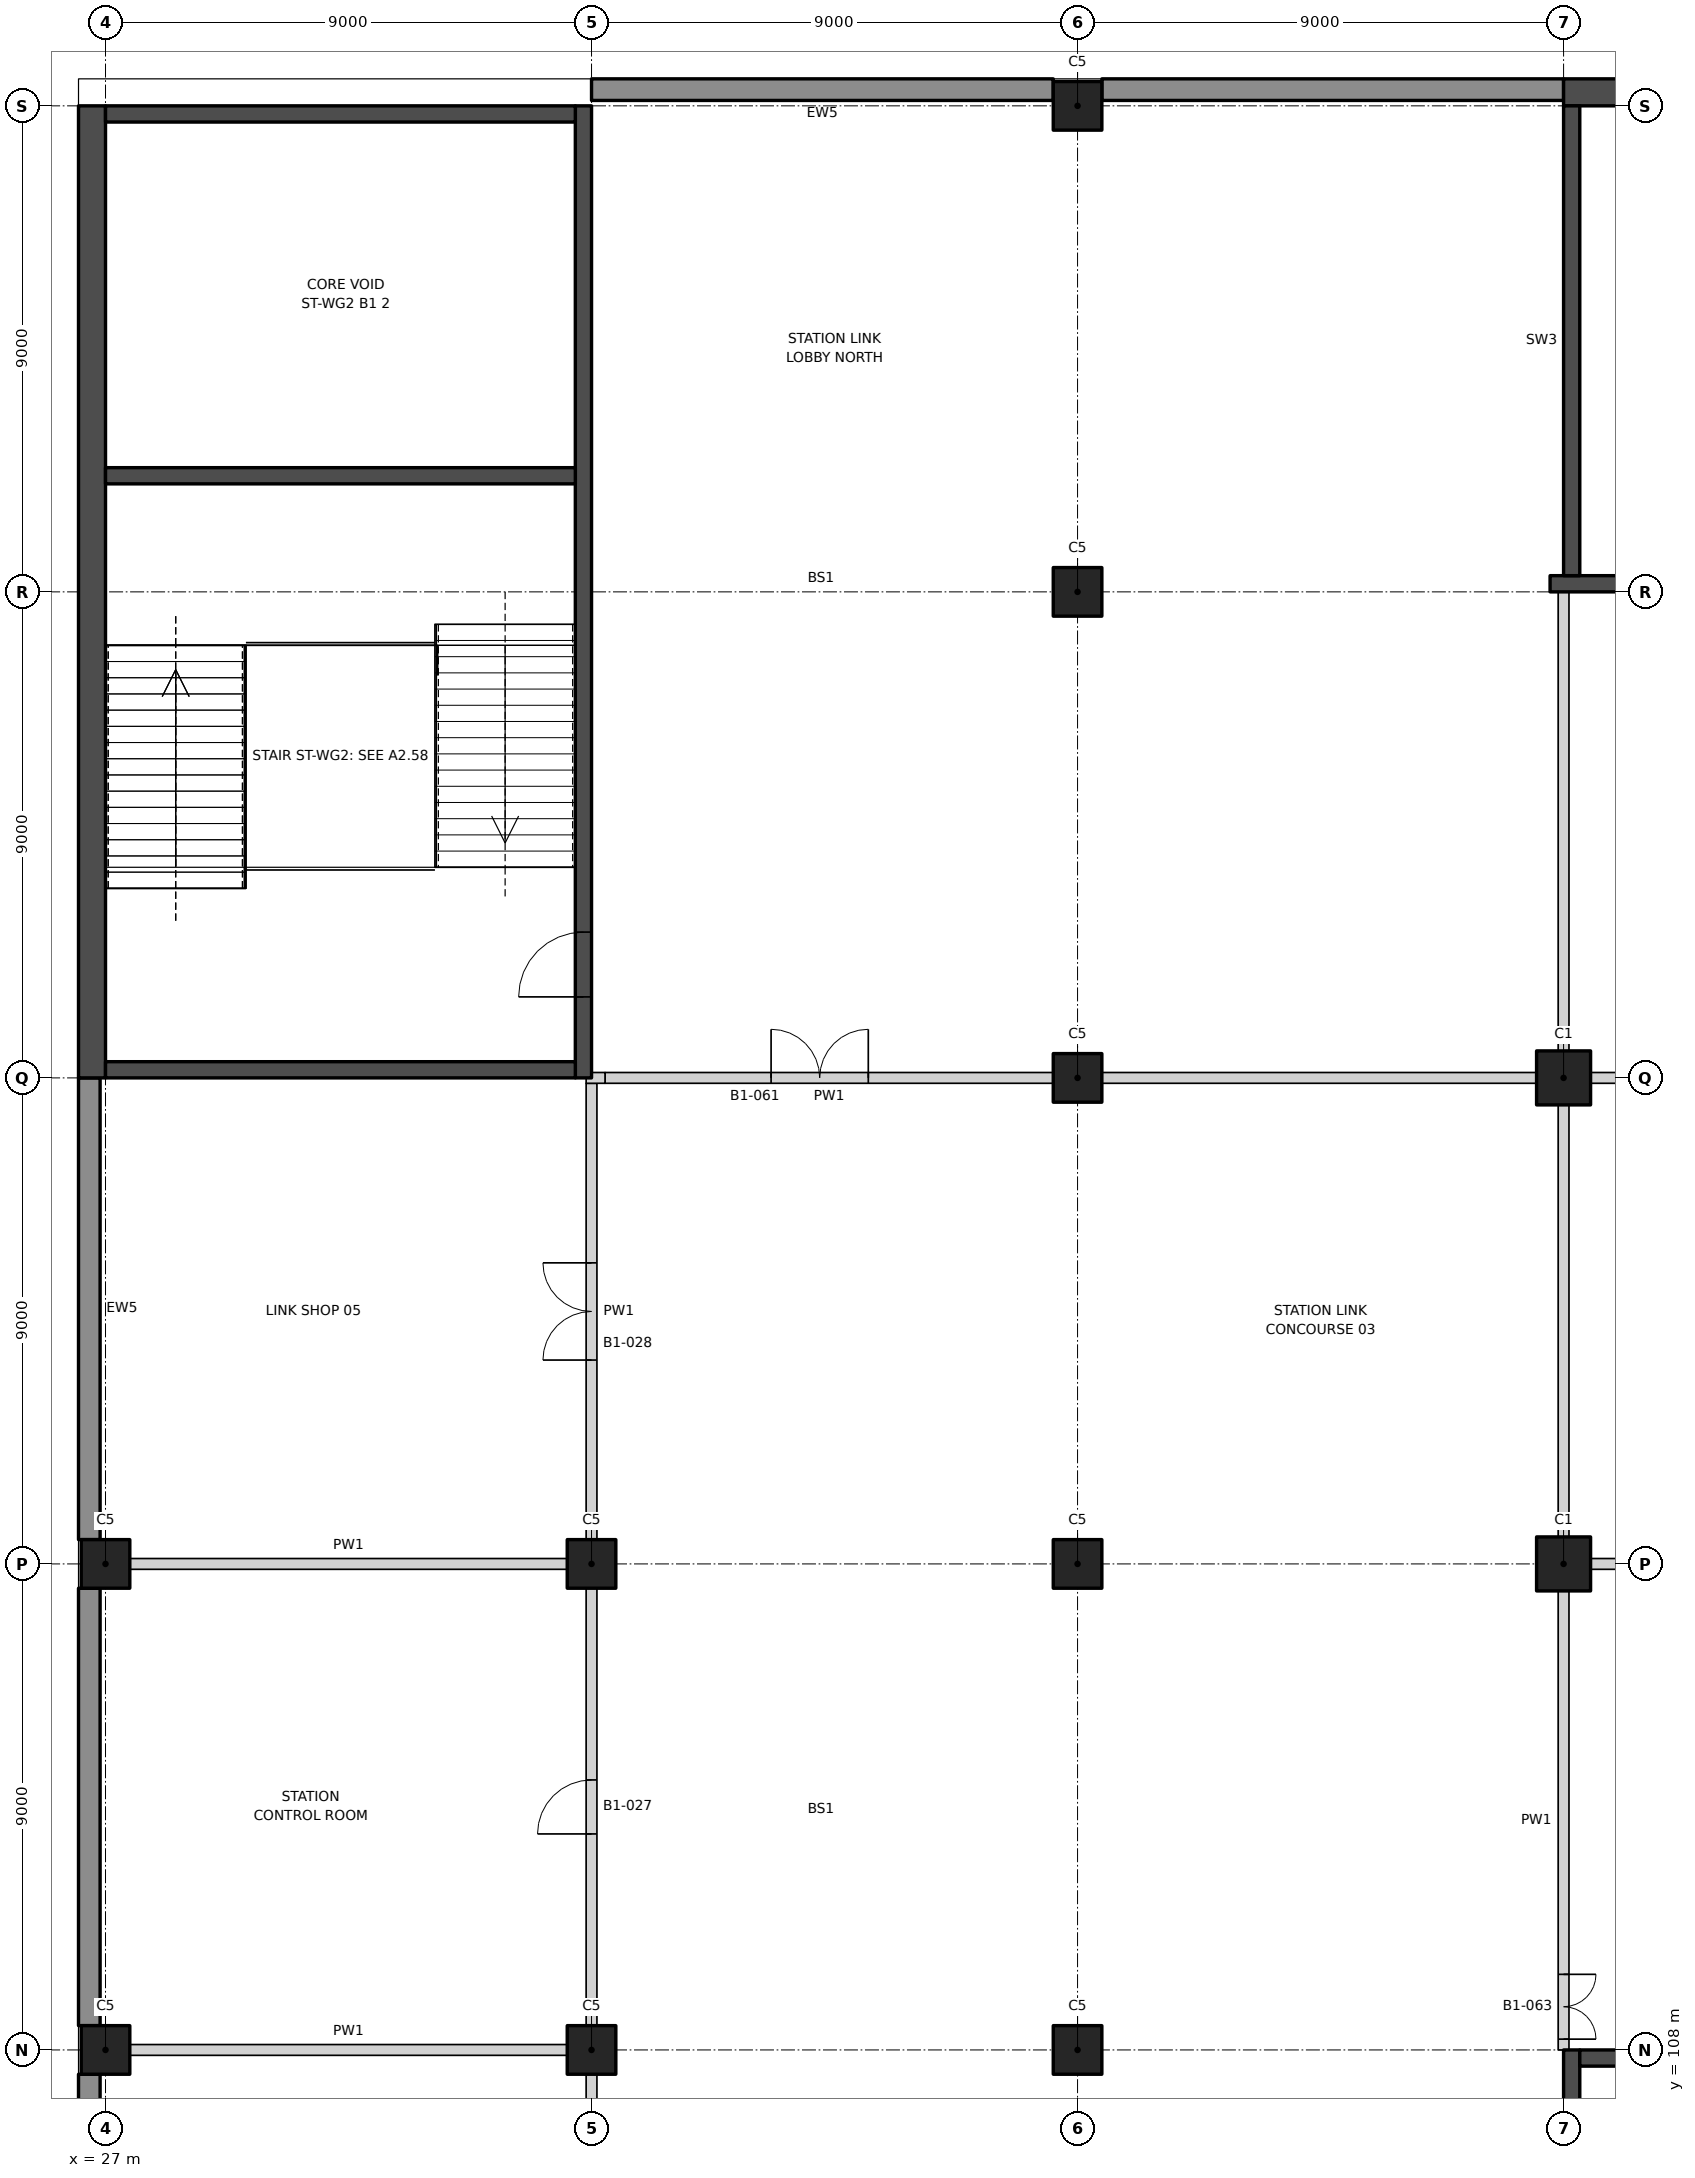
"""IFC4 building model, lengths in metres.
Left out: names, types, materials, properties, quantities, classifications, styles, units other than length and angle.
Written with IfcOpenShell. Run it as: python <this file> out.ifc"""

import sys

from ifc_helpers import new_model, si_unit, direction, frame, frame_2d, origin, origin_2d, place, context, subcontext, project, spatial, rectangle, extrude, element, fill, save


model = new_model("IFC4")
c1 = context("Model", 3, precision=1e-05, world=origin(), true_north=direction((0.0, 1.0)))
c2 = subcontext(c1, "Body", "Model", "MODEL_VIEW")
j1 = project(units=[si_unit("LENGTHUNIT", "METRE"), si_unit("PLANEANGLEUNIT", "RADIAN")], contexts=[c1])
p1 = place(None, origin())
s1 = spatial("IfcSite", under=j1, at=p1, CompositionType="ELEMENT")
p2 = place(p1, origin())
s2 = spatial("IfcBuilding", under=s1, at=p2, CompositionType="ELEMENT")
p3 = place(p2, frame((0.0, 0.0, -6.0)))
s3 = spatial("IfcBuildingStorey", under=s2, at=p3, CompositionType="ELEMENT", Elevation=-6.0)
for number, where, z_axis, x_axis in (
    (1, (54.0, 117.0, 0.0), (0.0, 0.0, 1.0), (1.0, 0.0, 0.0)),
    (2, (54.0, 126.0, 0.0), (0.0, 0.0, 1.0), (1.0, 0.0, 0.0)),
):
    element("IfcColumn", number, at=place(p3, frame(where, z_axis=z_axis, x_axis=x_axis)), inside=s3, PredefinedType="COLUMN", context=c2, shape_type="SweptSolid", body=[
        extrude(rectangle(XDim=1.0, YDim=1.0, at=origin_2d()), origin(), (0.0, 0.0, 1.0), 6.0),
    ])
for number, where, z_axis, x_axis in (
    (3, (27.0, 108.0, 0.0), (0.0, 0.0, 1.0), (1.0, 0.0, 0.0)),
    (4, (27.0, 117.0, 0.0), (0.0, 0.0, 1.0), (1.0, 0.0, 0.0)),
    (5, (36.0, 108.0, 0.0), (0.0, 0.0, 1.0), (1.0, 0.0, 0.0)),
    (6, (36.0, 117.0, 0.0), (0.0, 0.0, 1.0), (1.0, 0.0, 0.0)),
    (7, (45.0, 108.0, 0.0), (0.0, 0.0, 1.0), (1.0, 0.0, 0.0)),
    (8, (45.0, 117.0, 0.0), (0.0, 0.0, 1.0), (1.0, 0.0, 0.0)),
    (9, (45.0, 126.0, 0.0), (0.0, 0.0, 1.0), (1.0, 0.0, 0.0)),
    (10, (45.0, 135.0, 0.0), (0.0, 0.0, 1.0), (1.0, 0.0, 0.0)),
    (11, (45.0, 144.0, 0.0), (0.0, 0.0, 1.0), (1.0, 0.0, 0.0)),
):
    element("IfcColumn", number, at=place(p3, frame(where, z_axis=z_axis, x_axis=x_axis)), inside=s3, PredefinedType="COLUMN", context=c2, shape_type="SweptSolid", body=[
        extrude(rectangle(XDim=0.9, YDim=0.9, at=origin_2d()), origin(), (0.0, 0.0, 1.0), 6.0),
    ])
for number, where, z_axis, x_axis in (
    (12, (27.45, 108.0, 0.0), (0.0, 0.0, 1.0), (1.0, 0.0, 0.0)),
    (13, (27.45, 117.0, 0.0), (0.0, 0.0, 1.0), (1.0, 0.0, 0.0)),
):
    element("IfcWall", number, at=place(p3, frame(where, z_axis=z_axis, x_axis=x_axis)), inside=s3, PredefinedType="PARTITIONING", context=c2, shape_type="SweptSolid", body=[
        extrude(rectangle(XDim=8.1, YDim=0.2, at=frame_2d((4.05, 0.0))), origin(), (0.0, 0.0, 1.0), 4.65),
    ])
for number, where, z_axis, x_axis in (
    (14, (54.5, 117.0, 0.0), (0.0, 0.0, 1.0), (1.0, 0.0, 0.0)),
    (15, (45.45, 126.0, 0.0), (0.0, 0.0, 1.0), (1.0, 0.0, 0.0)),
):
    element("IfcWall", number, at=place(p3, frame(where, z_axis=z_axis, x_axis=x_axis)), inside=s3, PredefinedType="PARTITIONING", context=c2, shape_type="SweptSolid", body=[
        extrude(rectangle(XDim=8.05, YDim=0.2, at=frame_2d((4.025, 0.0))), origin(), (0.0, 0.0, 1.0), 4.65),
    ])
p4 = place(p3, frame((36.25, 126.0, 0.0), z_axis=(0.0, 0.0, 1.0), x_axis=(1.0, 0.0, 0.0)))
e16 = element("IfcWall", 16, at=p4, inside=s3, PredefinedType="PARTITIONING", context=c2, shape_type="SweptSolid", body=[
    extrude(rectangle(XDim=8.3, YDim=0.2, at=frame_2d((4.15, 0.0))), origin(), (0.0, 0.0, 1.0), 4.65),
])
p5 = place(p4, frame((3.075, 0.0, 0.0)))
e17 = element("IfcOpeningElement", 17, at=p5, cuts=e16, PredefinedType="OPENING", context=c2, shape_type="SweptSolid", body=[
    extrude(rectangle(XDim=1.8, YDim=2.1, at=frame_2d((0.9, 1.05))), frame((0.0, 0.11, 0.0), z_axis=(0.0, -1.0, 0.0), x_axis=(1.0, 0.0, 0.0)), (0.0, 0.0, 1.0), 0.22),
])
p6 = place(p3, frame((54.5, 126.0, 0.0), z_axis=(0.0, 0.0, 1.0), x_axis=(1.0, 0.0, 0.0)))
e18 = element("IfcWall", 18, at=p6, inside=s3, PredefinedType="PARTITIONING", context=c2, shape_type="SweptSolid", body=[
    extrude(rectangle(XDim=8.05, YDim=0.2, at=frame_2d((4.025, 0.0))), origin(), (0.0, 0.0, 1.0), 4.65),
])
p7 = place(p3, frame((36.0, 99.45, 0.0), z_axis=(0.0, 0.0, 1.0), x_axis=(0.0, 1.0, 0.0)))
e19 = element("IfcWall", 19, at=p7, inside=s3, PredefinedType="PARTITIONING", context=c2, shape_type="SweptSolid", body=[
    extrude(rectangle(XDim=8.1, YDim=0.2, at=frame_2d((4.05, 0.0))), origin(), (0.0, 0.0, 1.0), 4.65),
])
p8 = place(p7, frame((3.15, 0.0, 0.0)))
e20 = element("IfcOpeningElement", 20, at=p8, cuts=e19, PredefinedType="OPENING", context=c2, shape_type="SweptSolid", body=[
    extrude(rectangle(XDim=1.8, YDim=2.1, at=frame_2d((0.9, 1.05))), frame((0.0, 0.11, 0.0), z_axis=(0.0, -1.0, 0.0), x_axis=(1.0, 0.0, 0.0)), (0.0, 0.0, 1.0), 0.22),
])
p9 = place(p3, frame((36.0, 108.45, 0.0), z_axis=(0.0, 0.0, 1.0), x_axis=(0.0, 1.0, 0.0)))
e21 = element("IfcWall", 21, at=p9, inside=s3, PredefinedType="PARTITIONING", context=c2, shape_type="SweptSolid", body=[
    extrude(rectangle(XDim=8.1, YDim=0.2, at=frame_2d((4.05, 0.0))), origin(), (0.0, 0.0, 1.0), 4.65),
])
p10 = place(p9, frame((3.55, 0.0, 0.0)))
e22 = element("IfcOpeningElement", 22, at=p10, cuts=e21, PredefinedType="OPENING", context=c2, shape_type="SweptSolid", body=[
    extrude(rectangle(XDim=1.0, YDim=2.1, at=frame_2d((0.5, 1.05))), frame((0.0, 0.11, 0.0), z_axis=(0.0, -1.0, 0.0), x_axis=(1.0, 0.0, 0.0)), (0.0, 0.0, 1.0), 0.22),
])
p11 = place(p3, frame((36.0, 117.45, 0.0), z_axis=(0.0, 0.0, 1.0), x_axis=(0.0, 1.0, 0.0)))
e23 = element("IfcWall", 23, at=p11, inside=s3, PredefinedType="PARTITIONING", context=c2, shape_type="SweptSolid", body=[
    extrude(rectangle(XDim=8.45, YDim=0.2, at=frame_2d((4.225, 0.0))), origin(), (0.0, 0.0, 1.0), 4.65),
])
p12 = place(p11, frame((3.325, 0.0, 0.0)))
e24 = element("IfcOpeningElement", 24, at=p12, cuts=e23, PredefinedType="OPENING", context=c2, shape_type="SweptSolid", body=[
    extrude(rectangle(XDim=1.8, YDim=2.1, at=frame_2d((0.9, 1.05))), frame((0.0, 0.11, 0.0), z_axis=(0.0, -1.0, 0.0), x_axis=(1.0, 0.0, 0.0)), (0.0, 0.0, 1.0), 0.22),
])
p13 = place(p3, frame((54.0, 108.0, 0.0), z_axis=(0.0, 0.0, 1.0), x_axis=(0.0, 1.0, 0.0)))
e25 = element("IfcWall", 25, at=p13, inside=s3, PredefinedType="PARTITIONING", context=c2, shape_type="SweptSolid", body=[
    extrude(rectangle(XDim=8.5, YDim=0.2, at=frame_2d((4.25, 0.0))), origin(), (0.0, 0.0, 1.0), 4.65),
])
p14 = place(p13, frame((0.2, 0.0, 0.0)))
e26 = element("IfcOpeningElement", 26, at=p14, cuts=e25, PredefinedType="OPENING", context=c2, shape_type="SweptSolid", body=[
    extrude(rectangle(XDim=1.2, YDim=2.1, at=frame_2d((0.6, 1.05))), frame((0.0, 0.11, 0.0), z_axis=(0.0, -1.0, 0.0), x_axis=(1.0, 0.0, 0.0)), (0.0, 0.0, 1.0), 0.22),
])
p15 = place(p3, frame((54.0, 117.5, 0.0), z_axis=(0.0, 0.0, 1.0), x_axis=(0.0, 1.0, 0.0)))
e27 = element("IfcWall", 27, at=p15, inside=s3, PredefinedType="PARTITIONING", context=c2, shape_type="SweptSolid", body=[
    extrude(rectangle(XDim=8.0, YDim=0.2, at=frame_2d((4.0, 0.0))), origin(), (0.0, 0.0, 1.0), 4.65),
])
p16 = place(p3, frame((54.0, 126.5, 0.0), z_axis=(0.0, 0.0, 1.0), x_axis=(0.0, 1.0, 0.0)))
e28 = element("IfcWall", 28, at=p16, inside=s3, PredefinedType="PARTITIONING", context=c2, shape_type="SweptSolid", body=[
    extrude(rectangle(XDim=8.5, YDim=0.2, at=frame_2d((4.25, 0.0))), origin(), (0.0, 0.0, 1.0), 4.65),
])
for number, where, z_axis, x_axis in (
    (29, (44.55, 144.3, 0.0), (0.0, 0.0, 1.0), (-1.0, 0.0, 0.0)),
    (30, (54.0, 144.3, 0.0), (0.0, 0.0, 1.0), (-1.0, 0.0, 0.0)),
):
    element("IfcWall", number, at=place(p3, frame(where, z_axis=z_axis, x_axis=x_axis)), inside=s3, PredefinedType="SOLIDWALL", context=c2, shape_type="SweptSolid", body=[
        extrude(rectangle(XDim=8.55, YDim=0.4, at=frame_2d((4.275, 0.0))), origin(), (0.0, 0.0, 1.0), 6.0),
    ])
for number, where, z_axis, x_axis in (
    (31, (26.7, 107.55, 0.0), (0.0, 0.0, 1.0), (0.0, -1.0, 0.0)),
    (32, (26.7, 116.55, 0.0), (0.0, 0.0, 1.0), (0.0, -1.0, 0.0)),
):
    element("IfcWall", number, at=place(p3, frame(where, z_axis=z_axis, x_axis=x_axis)), inside=s3, PredefinedType="SOLIDWALL", context=c2, shape_type="SweptSolid", body=[
        extrude(rectangle(XDim=8.1, YDim=0.4, at=frame_2d((4.05, 0.0))), origin(), (0.0, 0.0, 1.0), 6.0),
    ])
p17 = place(p3, frame((26.7, 126.0, 0.0), z_axis=(0.0, 0.0, 1.0), x_axis=(0.0, -1.0, 0.0)))
e33 = element("IfcWall", 33, at=p17, inside=s3, PredefinedType="SOLIDWALL", context=c2, shape_type="SweptSolid", body=[
    extrude(rectangle(XDim=8.55, YDim=0.4, at=frame_2d((4.275, 0.0))), origin(), (0.0, 0.0, 1.0), 6.0),
])
p18 = place(p3, frame((72.0, 135.15, 0.0), z_axis=(0.0, 0.0, 1.0), x_axis=(-1.0, 0.0, 0.0)))
e34 = element("IfcWall", 34, at=p18, inside=s3, PredefinedType="SHEAR", context=c2, shape_type="SweptSolid", body=[
    extrude(rectangle(XDim=18.25, YDim=0.3, at=frame_2d((9.125, 0.0))), origin(), (0.0, 0.0, 1.0), 6.0),
])
p19 = place(p3, frame((72.0, 144.25, 0.0), z_axis=(0.0, 0.0, 1.0), x_axis=(-1.0, 0.0, 0.0)))
e35 = element("IfcWall", 35, at=p19, inside=s3, PredefinedType="SHEAR", context=c2, shape_type="SweptSolid", body=[
    extrude(rectangle(XDim=18.0, YDim=0.5, at=frame_2d((9.0, 0.0))), origin(), (0.0, 0.0, 1.0), 6.0),
])
p20 = place(p3, frame((54.15, 135.3, 0.0), z_axis=(0.0, 0.0, 1.0), x_axis=(0.0, 1.0, 0.0)))
e36 = element("IfcWall", 36, at=p20, inside=s3, PredefinedType="SHEAR", context=c2, shape_type="SweptSolid", body=[
    extrude(rectangle(XDim=8.7, YDim=0.3, at=frame_2d((4.35, 0.0))), origin(), (0.0, 0.0, 1.0), 6.0),
])
p21 = place(p3, frame((54.15, 108.0, 0.0), z_axis=(0.0, 0.0, 1.0), x_axis=(0.0, -1.0, 0.0)))
e37 = element("IfcWall", 37, at=p21, inside=s3, PredefinedType="SHEAR", context=c2, shape_type="SweptSolid", body=[
    extrude(rectangle(XDim=18.0, YDim=0.3, at=frame_2d((9.0, 0.0))), origin(), (0.0, 0.0, 1.0), 6.0),
])
p22 = place(p21, frame((8.6, 0.0, 0.0)))
e38 = element("IfcOpeningElement", 38, at=p22, cuts=e37, PredefinedType="OPENING", context=c2, shape_type="SweptSolid", body=[
    extrude(rectangle(XDim=1.2, YDim=2.1, at=frame_2d((0.6, 1.05))), frame((0.0, 0.16, 0.0), z_axis=(0.0, -1.0, 0.0), x_axis=(1.0, 0.0, 0.0)), (0.0, 0.0, 1.0), 0.32),
])
p23 = place(p3, frame((62.7, 107.85, 0.0), z_axis=(0.0, 0.0, 1.0), x_axis=(-1.0, 0.0, 0.0)))
e39 = element("IfcWall", 39, at=p23, inside=s3, PredefinedType="SHEAR", context=c2, shape_type="SweptSolid", body=[
    extrude(rectangle(XDim=8.4, YDim=0.3, at=frame_2d((4.2, 0.0))), origin(), (0.0, 0.0, 1.0), 6.0),
])
p24 = place(p3, frame((35.85, 126.0, 0.0), z_axis=(0.0, 0.0, 1.0), x_axis=(0.0, 1.0, 0.0)))
e40 = element("IfcWall", 40, at=p24, inside=s3, PredefinedType="SHEAR", context=c2, shape_type="SweptSolid", body=[
    extrude(rectangle(XDim=18.0, YDim=0.3, at=frame_2d((9.0, 0.0))), origin(), (0.0, 0.0, 1.0), 6.0),
])
p25 = place(p24, frame((1.5, 0.0, 0.0)))
e41 = element("IfcOpeningElement", 41, at=p25, cuts=e40, PredefinedType="OPENING", context=c2, shape_type="SweptSolid", body=[
    extrude(rectangle(XDim=1.2, YDim=2.1, at=frame_2d((0.6, 1.05))), frame((0.0, 0.16, 0.0), z_axis=(0.0, -1.0, 0.0), x_axis=(1.0, 0.0, 0.0)), (0.0, 0.0, 1.0), 0.32),
])
p26 = place(p3, frame((26.75, 126.0, 0.0), z_axis=(0.0, 0.0, 1.0), x_axis=(0.0, 1.0, 0.0)))
e42 = element("IfcWall", 42, at=p26, inside=s3, PredefinedType="SHEAR", context=c2, shape_type="SweptSolid", body=[
    extrude(rectangle(XDim=18.0, YDim=0.5, at=frame_2d((9.0, 0.0))), origin(), (0.0, 0.0, 1.0), 6.0),
])
for number, where, z_axis, x_axis in (
    (43, (35.7, 126.15, 0.0), (0.0, 0.0, 1.0), (-1.0, 0.0, 0.0)),
    (44, (35.7, 143.85, 0.0), (0.0, 0.0, 1.0), (-1.0, 0.0, 0.0)),
    (45, (35.7, 137.15, 0.0), (0.0, 0.0, 1.0), (-1.0, 0.0, 0.0)),
):
    element("IfcWall", number, at=place(p3, frame(where, z_axis=z_axis, x_axis=x_axis)), inside=s3, PredefinedType="SHEAR", context=c2, shape_type="SweptSolid", body=[
        extrude(rectangle(XDim=8.7, YDim=0.3, at=frame_2d((4.35, 0.0))), origin(), (0.0, 0.0, 1.0), 6.0),
    ])
p27 = place(p3, frame((35.9, 126.0, 0.0), z_axis=(0.0, 0.0, 1.0), x_axis=(1.0, 0.0, 0.0)))
e46 = element("IfcWall", 46, at=p27, inside=s3, PredefinedType="PARTITIONING", context=c2, shape_type="SweptSolid", body=[
    extrude(rectangle(XDim=0.35, YDim=0.2, at=frame_2d((0.175, 0.0))), origin(), (0.0, 0.0, 1.0), 6.0),
])
p28 = place(p10, origin())
e47 = element("IfcDoor", 47, at=p28, inside=s3, OperationType="SINGLE_SWING_LEFT", PredefinedType="DOOR", context=c2, shape_type="SweptSolid", body=[
    extrude(rectangle(XDim=1.0, YDim=2.1, at=frame_2d((0.5, 1.05))), frame((0.0, 0.025, 0.0), z_axis=(0.0, -1.0, 0.0), x_axis=(1.0, 0.0, 0.0)), (0.0, 0.0, 1.0), 0.05),
])
fill(e22, e47)
p29 = place(p12, origin())
e48 = element("IfcDoor", 48, at=p29, inside=s3, OperationType="DOUBLE_DOOR_DOUBLE_SWING", PredefinedType="DOOR", context=c2, shape_type="SweptSolid", body=[
    extrude(rectangle(XDim=1.8, YDim=2.1, at=frame_2d((0.9, 1.05))), frame((0.0, 0.025, 0.0), z_axis=(0.0, -1.0, 0.0), x_axis=(1.0, 0.0, 0.0)), (0.0, 0.0, 1.0), 0.05),
])
fill(e24, e48)
p30 = place(p5, origin())
e49 = element("IfcDoor", 49, at=p30, inside=s3, OperationType="DOUBLE_DOOR_DOUBLE_SWING", PredefinedType="DOOR", context=c2, shape_type="SweptSolid", body=[
    extrude(rectangle(XDim=1.8, YDim=2.1, at=frame_2d((0.9, 1.05))), frame((0.0, 0.025, 0.0), z_axis=(0.0, -1.0, 0.0), x_axis=(1.0, 0.0, 0.0)), (0.0, 0.0, 1.0), 0.05),
])
fill(e17, e49)
p31 = place(p14, frame((1.2, 0.0, 0.0), z_axis=(0.0, 0.0, 1.0), x_axis=(-1.0, 0.0, 0.0)))
e50 = element("IfcDoor", 50, at=p31, inside=s3, OperationType="DOUBLE_DOOR_DOUBLE_SWING", PredefinedType="DOOR", context=c2, shape_type="SweptSolid", body=[
    extrude(rectangle(XDim=1.2, YDim=2.1, at=frame_2d((0.6, 1.05))), frame((0.0, 0.025, 0.0), z_axis=(0.0, -1.0, 0.0), x_axis=(1.0, 0.0, 0.0)), (0.0, 0.0, 1.0), 0.05),
])
fill(e26, e50)
p32 = place(p25, origin())
e51 = element("IfcDoor", 51, at=p32, inside=s3, OperationType="SINGLE_SWING_LEFT", PredefinedType="DOOR", context=c2, shape_type="SweptSolid", body=[
    extrude(rectangle(XDim=1.2, YDim=2.1, at=frame_2d((0.6, 1.05))), frame((0.0, 0.025, 0.0), z_axis=(0.0, -1.0, 0.0), x_axis=(1.0, 0.0, 0.0)), (0.0, 0.0, 1.0), 0.05),
])
fill(e41, e51)
save(model, sys.argv[1])
